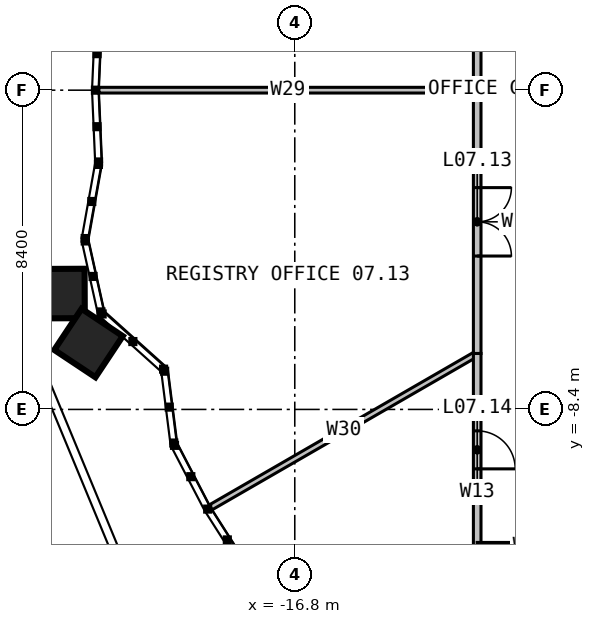
"""IFC4 building model, lengths in metres.
Left out: names, types, materials, properties, quantities, classifications, styles, units other than length and angle.
Written with IfcOpenShell. Run it as: python <this file> out.ifc"""

import sys

from ifc_helpers import new_model, si_unit, direction, frame, frame_2d, origin, place, context, subcontext, project, spatial, rectangle, extrude, element, fill, save


model = new_model("IFC4")
c1 = context("Model", 3, precision=1e-05, world=origin(), true_north=direction((0.0, 1.0)))
c2 = subcontext(c1, "Body", "Model", "MODEL_VIEW")
j1 = project(units=[si_unit("LENGTHUNIT", "METRE"), si_unit("PLANEANGLEUNIT", "RADIAN")], contexts=[c1])
p1 = place(None, origin())
s1 = spatial("IfcSite", under=j1, at=p1, CompositionType="ELEMENT")
p2 = place(p1, origin())
s2 = spatial("IfcBuilding", under=s1, at=p2, CompositionType="ELEMENT")
p3 = place(p2, frame((0.0, 0.0, 33.0)))
s3 = spatial("IfcBuildingStorey", under=s2, at=p3, CompositionType="ELEMENT", Elevation=33.0)
p4 = place(p3, frame((-12.0, 0.0, 0.0), z_axis=(0.0, 0.0, 1.0), x_axis=(-1.0, 0.0, 0.0)))
e1 = element("IfcWall", 1, at=p4, inside=s3, PredefinedType="PARTITIONING", context=c2, shape_type="SweptSolid", body=[
    extrude(rectangle(XDim=9.954, YDim=0.15, at=frame_2d((4.977, 0.0))), origin(), (0.0, 0.0, 1.0), 2.79),
])
p5 = place(p3, frame((-12.0, -6.928, 0.0), z_axis=(0.0, 0.0, 1.0), x_axis=(-0.866020891966, -0.500007814618, 0.0)))
e2 = element("IfcWall", 2, at=p5, inside=s3, PredefinedType="PARTITIONING", context=c2, shape_type="SweptSolid", body=[
    extrude(rectangle(XDim=8.097, YDim=0.15, at=frame_2d((4.048, 0.0))), origin(), (0.0, 0.0, 1.0), 2.79),
])
p6 = place(p3, frame((-12.0, 6.928, 0.0), z_axis=(0.0, 0.0, 1.0), x_axis=(0.0, -1.0, 0.0)))
e3 = element("IfcWall", 3, at=p6, inside=s3, PredefinedType="PARTITIONING", context=c2, shape_type="SweptSolid", body=[
    extrude(rectangle(XDim=6.928, YDim=0.2, at=frame_2d((3.464, 0.0))), origin(), (0.0, 0.0, 1.0), 3.8),
])
p7 = place(p6, frame((2.564, 0.0, 0.0)))
e4 = element("IfcOpeningElement", 4, at=p7, cuts=e3, PredefinedType="OPENING", context=c2, shape_type="SweptSolid", body=[
    extrude(rectangle(XDim=1.8, YDim=2.2, at=frame_2d((0.9, 1.1))), frame((0.0, 0.11, 0.0), z_axis=(0.0, -1.0, 0.0), x_axis=(1.0, 0.0, 0.0)), (0.0, 0.0, 1.0), 0.22),
])
p8 = place(p3, frame((-12.0, 0.0, 0.0), z_axis=(0.0, 0.0, 1.0), x_axis=(0.0, -1.0, 0.0)))
e5 = element("IfcWall", 5, at=p8, inside=s3, PredefinedType="PARTITIONING", context=c2, shape_type="SweptSolid", body=[
    extrude(rectangle(XDim=6.928, YDim=0.2, at=frame_2d((3.464, 0.0))), origin(), (0.0, 0.0, 1.0), 3.8),
])
p9 = place(p8, frame((2.564, 0.0, 0.0)))
e6 = element("IfcOpeningElement", 6, at=p9, cuts=e5, PredefinedType="OPENING", context=c2, shape_type="SweptSolid", body=[
    extrude(rectangle(XDim=1.8, YDim=2.2, at=frame_2d((0.9, 1.1))), frame((0.0, 0.11, 0.0), z_axis=(0.0, -1.0, 0.0), x_axis=(1.0, 0.0, 0.0)), (0.0, 0.0, 1.0), 0.22),
])
p10 = place(p3, frame((-12.0, -6.928, 0.0), z_axis=(0.0, 0.0, 1.0), x_axis=(0.0, -1.0, 0.0)))
e7 = element("IfcWall", 7, at=p10, inside=s3, PredefinedType="PARTITIONING", context=c2, shape_type="SweptSolid", body=[
    extrude(rectangle(XDim=5.072, YDim=0.2, at=frame_2d((2.536, 0.0))), origin(), (0.0, 0.0, 1.0), 3.8),
])
p11 = place(p10, frame((2.036, 0.0, 0.0)))
e8 = element("IfcOpeningElement", 8, at=p11, cuts=e7, PredefinedType="OPENING", context=c2, shape_type="SweptSolid", body=[
    extrude(rectangle(XDim=1.0, YDim=2.2, at=frame_2d((0.5, 1.1))), frame((0.0, 0.11, 0.0), z_axis=(0.0, -1.0, 0.0), x_axis=(1.0, 0.0, 0.0)), (0.0, 0.0, 1.0), 0.22),
])
p12 = place(p3, frame((-12.0, -12.0, 0.0), z_axis=(0.0, 0.0, 1.0), x_axis=(1.0, 0.0, 0.0)))
e9 = element("IfcWall", 9, at=p12, inside=s3, PredefinedType="PARTITIONING", context=c2, shape_type="SweptSolid", body=[
    extrude(rectangle(XDim=2.792, YDim=0.2, at=frame_2d((1.396, 0.0))), origin(), (0.0, 0.0, 1.0), 3.8),
])
p13 = place(p9, origin())
e10 = element("IfcDoor", 10, at=p13, inside=s3, OperationType="DOUBLE_DOOR_SINGLE_SWING", PredefinedType="DOOR", context=c2, shape_type="SweptSolid", body=[
    extrude(rectangle(XDim=1.8, YDim=2.2, at=frame_2d((0.9, 1.1))), frame((0.0, 0.025, 0.0), z_axis=(0.0, -1.0, 0.0), x_axis=(1.0, 0.0, 0.0)), (0.0, 0.0, 1.0), 0.05),
])
fill(e6, e10)
p14 = place(p11, origin())
e11 = element("IfcDoor", 11, at=p14, inside=s3, OperationType="SINGLE_SWING_RIGHT", PredefinedType="DOOR", context=c2, shape_type="SweptSolid", body=[
    extrude(rectangle(XDim=1.0, YDim=2.2, at=frame_2d((0.5, 1.1))), frame((0.0, 0.025, 0.0), z_axis=(0.0, -1.0, 0.0), x_axis=(1.0, 0.0, 0.0)), (0.0, 0.0, 1.0), 0.05),
])
fill(e8, e11)
save(model, sys.argv[1])
